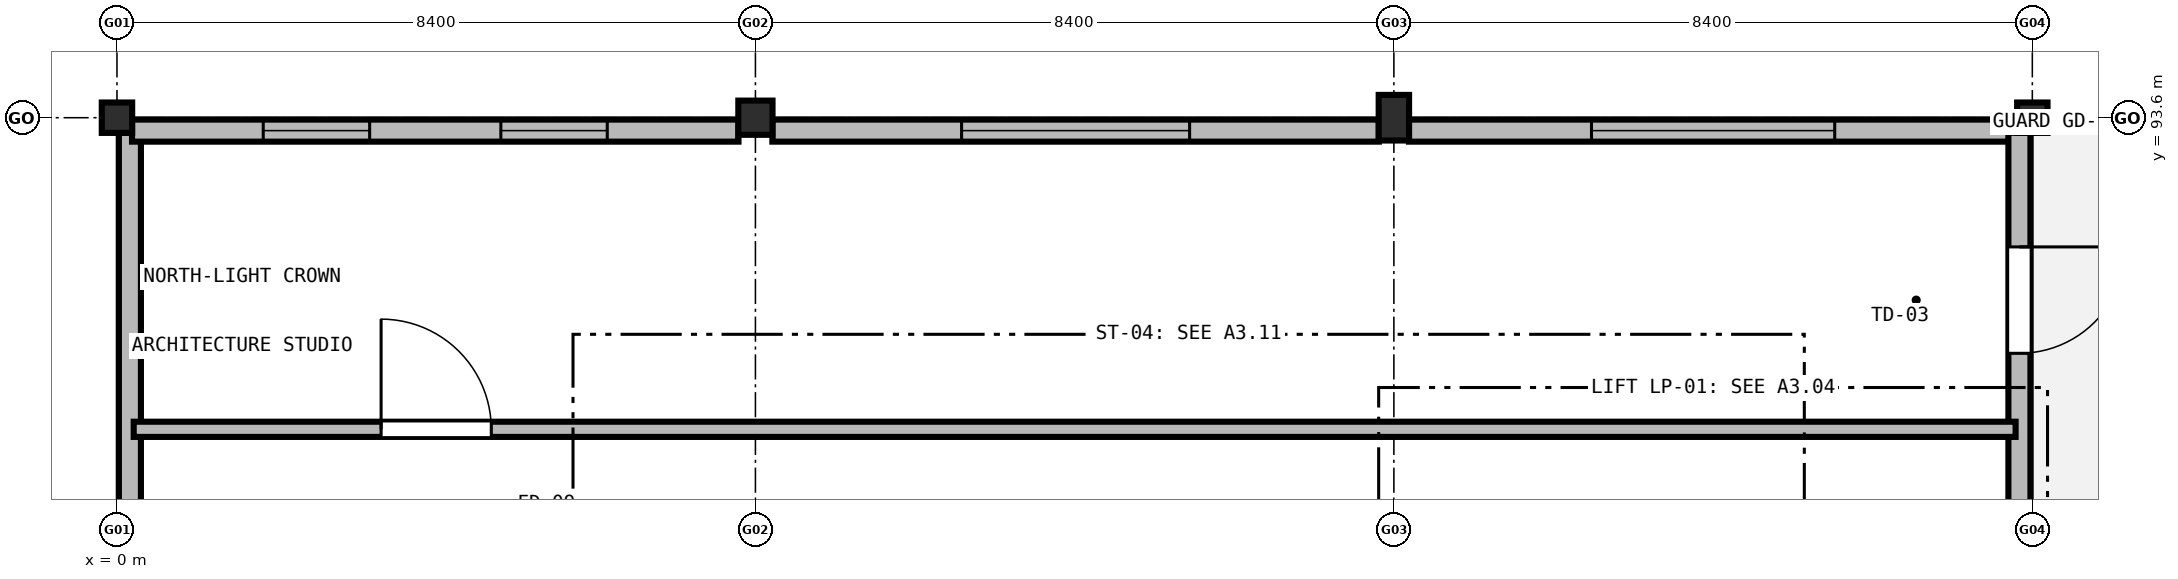
"""IFC4 building model, lengths in metres.
Left out: names, types, materials, properties, quantities, classifications, styles, units other than length and angle.
Written with IfcOpenShell. Run it as: python <this file> out.ifc"""

import sys

from ifc_helpers import new_model, si_unit, direction, frame, frame_2d, origin, origin_2d, place, context, subcontext, project, spatial, rectangle, extrude, element, fill, save


model = new_model("IFC4")
c1 = context("Model", 3, precision=1e-05, world=origin(), true_north=direction((0.0, 1.0)))
c2 = subcontext(c1, "Body", "Model", "MODEL_VIEW")
j1 = project(units=[si_unit("LENGTHUNIT", "METRE"), si_unit("PLANEANGLEUNIT", "RADIAN")], contexts=[c1])
p1 = place(None, origin())
s1 = spatial("IfcSite", under=j1, at=p1, CompositionType="ELEMENT")
p2 = place(p1, origin())
s2 = spatial("IfcBuilding", under=s1, at=p2, CompositionType="ELEMENT")
p3 = place(p2, frame((0.0, 0.0, 21.9)))
s3 = spatial("IfcBuildingStorey", under=s2, at=p3, CompositionType="ELEMENT", Elevation=21.9)
p4 = place(p3, frame((0.0, 93.6, 0.0), z_axis=(0.0, 0.0, 1.0), x_axis=(1.0, 0.0, 0.0)))
e1 = element("IfcColumn", 1, at=p4, inside=s3, PredefinedType="COLUMN", context=c2, shape_type="SweptSolid", body=[
    extrude(rectangle(XDim=0.4, YDim=0.4, at=origin_2d()), origin(), (0.0, 0.0, 1.0), 4.2),
])
p5 = place(p3, frame((8.4, 93.6, 0.0), z_axis=(0.0, 0.0, 1.0), x_axis=(1.0, 0.0, 0.0)))
e2 = element("IfcColumn", 2, at=p5, inside=s3, PredefinedType="COLUMN", context=c2, shape_type="SweptSolid", body=[
    extrude(rectangle(XDim=0.45, YDim=0.45, at=origin_2d()), origin(), (0.0, 0.0, 1.0), 4.2),
])
p6 = place(p3, frame((16.8, 93.6, 0.0), z_axis=(0.0, 0.0, 1.0), x_axis=(1.0, 0.0, 0.0)))
e3 = element("IfcColumn", 3, at=p6, inside=s3, PredefinedType="COLUMN", context=c2, shape_type="SweptSolid", body=[
    extrude(rectangle(XDim=0.4, YDim=0.6, at=origin_2d()), origin(), (0.0, 0.0, 1.0), 4.2),
])
p7 = place(p3, frame((25.2, 93.6, 0.0), z_axis=(0.0, 0.0, 1.0), x_axis=(1.0, 0.0, 0.0)))
e4 = element("IfcColumn", 4, at=p7, inside=s3, PredefinedType="COLUMN", context=c2, shape_type="SweptSolid", body=[
    extrude(rectangle(XDim=0.4, YDim=0.4, at=origin_2d()), origin(), (0.0, 0.0, 1.0), 4.2),
])
p8 = place(p3, frame((0.17, 86.623, 0.0), z_axis=(0.0, 0.0, 1.0), x_axis=(0.0, 1.0, 0.0)))
e5 = element("IfcWall", 5, at=p8, inside=s3, PredefinedType="SOLIDWALL", context=c2, shape_type="SweptSolid", body=[
    extrude(rectangle(XDim=6.779, YDim=0.29, at=frame_2d((3.39, 0.0))), origin(), (0.0, 0.0, 1.0), 3.475),
])
p9 = place(p3, frame((0.198, 93.43, 0.0), z_axis=(0.0, 0.0, 1.0), x_axis=(1.0, 0.0, 0.0)))
e6 = element("IfcWall", 6, at=p9, inside=s3, PredefinedType="SOLIDWALL", context=c2, shape_type="SweptSolid", body=[
    extrude(rectangle(XDim=7.979, YDim=0.29, at=frame_2d((3.99, 0.0))), origin(), (0.0, 0.0, 1.0), 3.86),
])
p10 = place(p9, frame((1.726, 0.0, 0.95)))
e7 = element("IfcOpeningElement", 7, at=p10, cuts=e6, PredefinedType="OPENING", context=c2, shape_type="SweptSolid", body=[
    extrude(rectangle(XDim=1.4, YDim=1.9, at=frame_2d((0.7, 0.95))), frame((0.0, 0.155, 0.0), z_axis=(0.0, -1.0, 0.0), x_axis=(1.0, 0.0, 0.0)), (0.0, 0.0, 1.0), 0.31),
])
p11 = place(p9, frame((4.853, 0.0, 0.95)))
e8 = element("IfcOpeningElement", 8, at=p11, cuts=e6, PredefinedType="OPENING", context=c2, shape_type="SweptSolid", body=[
    extrude(rectangle(XDim=1.4, YDim=1.9, at=frame_2d((0.7, 0.95))), frame((0.0, 0.155, 0.0), z_axis=(0.0, -1.0, 0.0), x_axis=(1.0, 0.0, 0.0)), (0.0, 0.0, 1.0), 0.31),
])
p12 = place(p3, frame((8.623, 93.43, 0.0), z_axis=(0.0, 0.0, 1.0), x_axis=(1.0, 0.0, 0.0)))
e9 = element("IfcWall", 9, at=p12, inside=s3, PredefinedType="SOLIDWALL", context=c2, shape_type="SweptSolid", body=[
    extrude(rectangle(XDim=7.979, YDim=0.29, at=frame_2d((3.99, 0.0))), origin(), (0.0, 0.0, 1.0), 3.86),
])
p13 = place(p12, frame((2.49, 0.0, 0.95)))
e10 = element("IfcOpeningElement", 10, at=p13, cuts=e9, PredefinedType="OPENING", context=c2, shape_type="SweptSolid", body=[
    extrude(rectangle(XDim=3.0, YDim=2.1, at=frame_2d((1.5, 1.05))), frame((0.0, 0.155, 0.0), z_axis=(0.0, -1.0, 0.0), x_axis=(1.0, 0.0, 0.0)), (0.0, 0.0, 1.0), 0.31),
])
p14 = place(p3, frame((16.998, 93.43, 0.0), z_axis=(0.0, 0.0, 1.0), x_axis=(1.0, 0.0, 0.0)))
e11 = element("IfcWall", 11, at=p14, inside=s3, PredefinedType="SOLIDWALL", context=c2, shape_type="SweptSolid", body=[
    extrude(rectangle(XDim=8.004, YDim=0.29, at=frame_2d((4.002, 0.0))), origin(), (0.0, 0.0, 1.0), 3.86),
])
p15 = place(p14, frame((2.402, 0.0, 0.95)))
e12 = element("IfcOpeningElement", 12, at=p15, cuts=e11, PredefinedType="OPENING", context=c2, shape_type="SweptSolid", body=[
    extrude(rectangle(XDim=3.2, YDim=2.2, at=frame_2d((1.6, 1.1))), frame((0.0, 0.155, 0.0), z_axis=(0.0, -1.0, 0.0), x_axis=(1.0, 0.0, 0.0)), (0.0, 0.0, 1.0), 0.31),
])
p16 = place(p3, frame((25.03, 93.402, 0.0), z_axis=(0.0, 0.0, 1.0), x_axis=(0.0, -1.0, 0.0)))
e13 = element("IfcWall", 13, at=p16, inside=s3, PredefinedType="SOLIDWALL", context=c2, shape_type="SweptSolid", body=[
    extrude(rectangle(XDim=6.779, YDim=0.29, at=frame_2d((3.39, 0.0))), origin(), (0.0, 0.0, 1.0), 3.475),
])
p17 = place(p16, frame((1.502, 0.0, 0.0)))
e14 = element("IfcOpeningElement", 14, at=p17, cuts=e13, PredefinedType="OPENING", context=c2, shape_type="SweptSolid", body=[
    extrude(rectangle(XDim=1.4, YDim=2.15, at=frame_2d((0.7, 1.075))), frame((0.0, 0.155, 0.0), z_axis=(0.0, -1.0, 0.0), x_axis=(1.0, 0.0, 0.0)), (0.0, 0.0, 1.0), 0.31),
])
p18 = place(p3, frame((0.22, 89.5, 0.0), z_axis=(0.0, 0.0, 1.0), x_axis=(1.0, 0.0, 0.0)))
e15 = element("IfcWall", 15, at=p18, inside=s3, PredefinedType="SOLIDWALL", context=c2, shape_type="SweptSolid", body=[
    extrude(rectangle(XDim=24.76, YDim=0.2, at=frame_2d((12.38, 0.0))), origin(), (0.0, 0.0, 1.0), 3.85),
])
p19 = place(p18, frame((3.255, 0.0, 0.0)))
e16 = element("IfcOpeningElement", 16, at=p19, cuts=e15, PredefinedType="OPENING", context=c2, shape_type="SweptSolid", body=[
    extrude(rectangle(XDim=1.45, YDim=2.2, at=frame_2d((0.725, 1.1))), frame((0.0, 0.11, 0.0), z_axis=(0.0, -1.0, 0.0), x_axis=(1.0, 0.0, 0.0)), (0.0, 0.0, 1.0), 0.22),
])
p20 = place(p10, origin())
e17 = element("IfcWindow", 17, at=p20, inside=s3, PartitioningType="SINGLE_PANEL", PredefinedType="WINDOW", context=c2, shape_type="SweptSolid", body=[
    extrude(rectangle(XDim=1.4, YDim=1.9, at=frame_2d((0.7, 0.95))), frame((0.0, 0.03, 0.0), z_axis=(0.0, -1.0, 0.0), x_axis=(1.0, 0.0, 0.0)), (0.0, 0.0, 1.0), 0.06),
])
fill(e7, e17)
p21 = place(p11, origin())
e18 = element("IfcWindow", 18, at=p21, inside=s3, PartitioningType="SINGLE_PANEL", PredefinedType="WINDOW", context=c2, shape_type="SweptSolid", body=[
    extrude(rectangle(XDim=1.4, YDim=1.9, at=frame_2d((0.7, 0.95))), frame((0.0, 0.03, 0.0), z_axis=(0.0, -1.0, 0.0), x_axis=(1.0, 0.0, 0.0)), (0.0, 0.0, 1.0), 0.06),
])
fill(e8, e18)
p22 = place(p13, origin())
e19 = element("IfcWindow", 19, at=p22, inside=s3, PartitioningType="SINGLE_PANEL", PredefinedType="WINDOW", context=c2, shape_type="SweptSolid", body=[
    extrude(rectangle(XDim=3.0, YDim=2.1, at=frame_2d((1.5, 1.05))), frame((0.0, 0.03, 0.0), z_axis=(0.0, -1.0, 0.0), x_axis=(1.0, 0.0, 0.0)), (0.0, 0.0, 1.0), 0.06),
])
fill(e10, e19)
p23 = place(p15, origin())
e20 = element("IfcWindow", 20, at=p23, inside=s3, PartitioningType="SINGLE_PANEL", PredefinedType="WINDOW", context=c2, shape_type="SweptSolid", body=[
    extrude(rectangle(XDim=3.2, YDim=2.2, at=frame_2d((1.6, 1.1))), frame((0.0, 0.03, 0.0), z_axis=(0.0, -1.0, 0.0), x_axis=(1.0, 0.0, 0.0)), (0.0, 0.0, 1.0), 0.06),
])
fill(e12, e20)
p24 = place(p17, origin())
e21 = element("IfcDoor", 21, at=p24, inside=s3, OperationType="SINGLE_SWING_LEFT", PredefinedType="DOOR", context=c2, shape_type="SweptSolid", body=[
    extrude(rectangle(XDim=1.4, YDim=2.15, at=frame_2d((0.7, 1.075))), frame((0.0, 0.025, 0.0), z_axis=(0.0, -1.0, 0.0), x_axis=(1.0, 0.0, 0.0)), (0.0, 0.0, 1.0), 0.05),
])
fill(e14, e21)
p25 = place(p19, origin())
e22 = element("IfcDoor", 22, at=p25, inside=s3, OperationType="SINGLE_SWING_LEFT", PredefinedType="DOOR", context=c2, shape_type="SweptSolid", body=[
    extrude(rectangle(XDim=1.45, YDim=2.2, at=frame_2d((0.725, 1.1))), frame((0.0, 0.025, 0.0), z_axis=(0.0, -1.0, 0.0), x_axis=(1.0, 0.0, 0.0)), (0.0, 0.0, 1.0), 0.05),
])
fill(e16, e22)
save(model, sys.argv[1])
